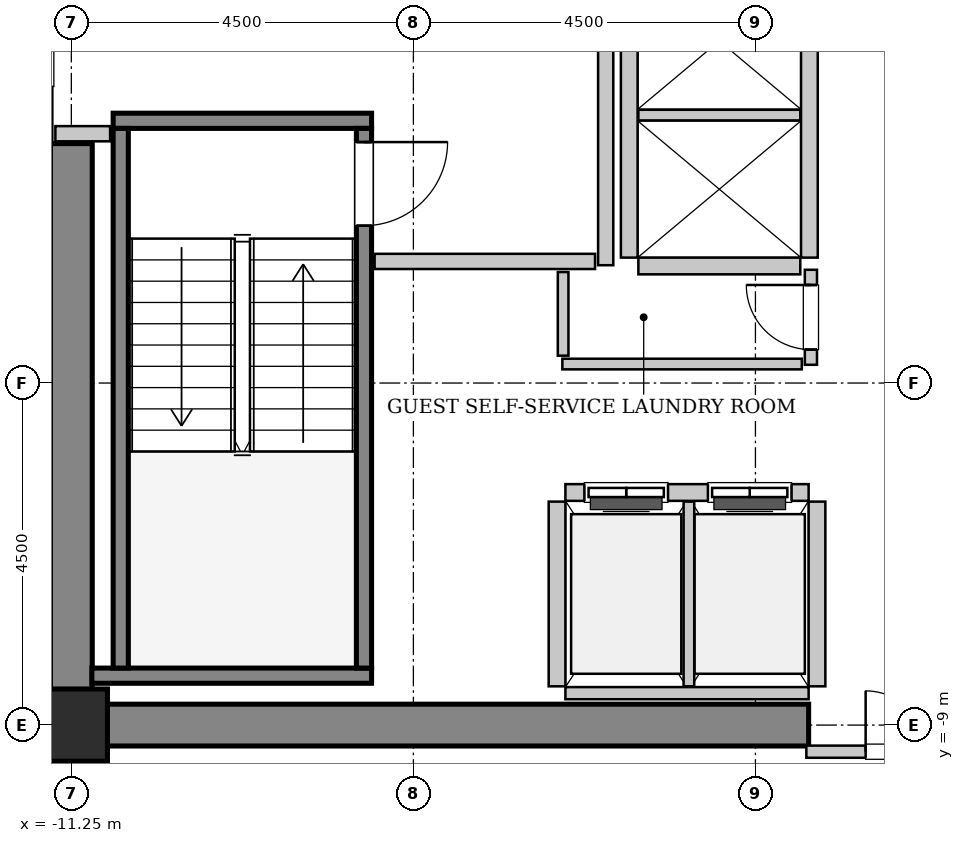
"""IFC4 building model, lengths in metres.
Left out: names, types, materials, properties, quantities, classifications, styles, units other than length and angle.
Written with IfcOpenShell. Run it as: python <this file> out.ifc"""

import sys

from ifc_helpers import new_model, si_unit, direction, frame, frame_2d, origin, origin_2d, place, context, subcontext, project, spatial, rectangle, hollow_rectangle, extrude, source, transform, mapped, element, fill, save


model = new_model("IFC4")
c1 = context("Model", 3, precision=1e-05, world=origin(), true_north=direction((0.0, 1.0)))
c2 = subcontext(c1, "Body", "Model", "MODEL_VIEW")
j1 = project(units=[si_unit("LENGTHUNIT", "METRE"), si_unit("PLANEANGLEUNIT", "RADIAN")], contexts=[c1])
p1 = place(None, origin())
s1 = spatial("IfcSite", under=j1, at=p1, CompositionType="ELEMENT")
p2 = place(p1, origin())
s2 = spatial("IfcBuilding", under=s1, at=p2, CompositionType="ELEMENT")
p3 = place(p2, frame((0.0, 0.0, 167.8)))
s3 = spatial("IfcBuildingStorey", under=s2, at=p3, CompositionType="ELEMENT", Elevation=167.8)
m1 = source(origin(), c2, "Body", "SweptSolid", [
    extrude(rectangle(XDim=9.975, YDim=0.55, at=frame_2d((4.987, 0.0))), origin(), (0.0, 0.0, 1.0), 3.8),
])
p4 = place(p3, frame((-11.525, -9.0, 0.0), z_axis=(0.0, 0.0, 1.0), x_axis=(1.0, 0.0, 0.0)))
e1 = element("IfcWall", 1, at=p4, inside=s3, PredefinedType="SHEAR", context=c2, shape_type="MappedRepresentation", body=[
    mapped(m1, transform((0.0, 0.0, 0.0), x_axis=(1.0, 0.0, 0.0), y_axis=(0.0, 1.0, 0.0), z_axis=(0.0, 0.0, 1.0), scale=1.0)),
])
m2 = source(origin(), c2, "Body", "SweptSolid", [
    extrude(rectangle(XDim=7.375, YDim=0.55, at=frame_2d((3.688, 0.0))), origin(), (0.0, 0.0, 1.0), 3.8),
])
p5 = place(p3, frame((-11.25, -8.725, 0.0), z_axis=(0.0, 0.0, 1.0), x_axis=(0.0, 1.0, 0.0)))
e2 = element("IfcWall", 2, at=p5, inside=s3, PredefinedType="SHEAR", context=c2, shape_type="MappedRepresentation", body=[
    mapped(m2, transform((0.0, 0.0, 0.0), x_axis=(1.0, 0.0, 0.0), y_axis=(0.0, 1.0, 0.0), z_axis=(0.0, 0.0, 1.0), scale=1.0)),
])
m3 = source(origin(), c2, "Body", "SweptSolid", [
    extrude(hollow_rectangle(XDim=0.95, YDim=0.95, WallThickness=0.045, InnerFilletRadius=0.045, OuterFilletRadius=0.09, at=origin_2d()), origin(), (0.0, 0.0, 1.0), 3.8),
])
p6 = place(p3, frame((-11.25, -9.0, 0.0), z_axis=(0.0, 0.0, 1.0), x_axis=(1.0, 0.0, 0.0)))
e3 = element("IfcColumn", 3, at=p6, inside=s3, PredefinedType="COLUMN", context=c2, shape_type="MappedRepresentation", body=[
    mapped(m3, transform((0.0, 0.0, 0.0), x_axis=(1.0, 0.0, 0.0), y_axis=(0.0, 1.0, 0.0), z_axis=(0.0, 0.0, 1.0), scale=1.0)),
])
m4 = source(origin(), c2, "Body", "SweptSolid", [
    extrude(rectangle(XDim=3.4, YDim=0.2, at=frame_2d((1.7, 0.0))), origin(), (0.0, 0.0, 1.0), 3.8),
])
p7 = place(p3, frame((-10.7, -1.05, 0.0), z_axis=(0.0, 0.0, 1.0), x_axis=(1.0, 0.0, 0.0)))
e4 = element("IfcWall", 4, at=p7, inside=s3, PredefinedType="SOLIDWALL", context=c2, shape_type="MappedRepresentation", body=[
    mapped(m4, transform((0.0, 0.0, 0.0), x_axis=(1.0, 0.0, 0.0), y_axis=(0.0, 1.0, 0.0), z_axis=(0.0, 0.0, 1.0), scale=1.0)),
])
m5 = source(origin(), c2, "Body", "SweptSolid", [
    extrude(rectangle(XDim=3.68, YDim=0.2, at=frame_2d((1.84, 0.0))), origin(), (0.0, 0.0, 1.0), 3.8),
])
p8 = place(p3, frame((-10.98, -8.35, 0.0), z_axis=(0.0, 0.0, 1.0), x_axis=(1.0, 0.0, 0.0)))
e5 = element("IfcWall", 5, at=p8, inside=s3, PredefinedType="SOLIDWALL", context=c2, shape_type="MappedRepresentation", body=[
    mapped(m5, transform((0.0, 0.0, 0.0), x_axis=(1.0, 0.0, 0.0), y_axis=(0.0, 1.0, 0.0), z_axis=(0.0, 0.0, 1.0), scale=1.0)),
])
m6 = source(origin(), c2, "Body", "SweptSolid", [
    extrude(rectangle(XDim=7.1, YDim=0.2, at=frame_2d((3.55, 0.0))), origin(), (0.0, 0.0, 1.0), 3.8),
])
p9 = place(p3, frame((-10.6, -1.15, 0.0), z_axis=(0.0, 0.0, 1.0), x_axis=(0.0, -1.0, 0.0)))
e6 = element("IfcWall", 6, at=p9, inside=s3, PredefinedType="SOLIDWALL", context=c2, shape_type="MappedRepresentation", body=[
    mapped(m6, transform((0.0, 0.0, 0.0), x_axis=(1.0, 0.0, 0.0), y_axis=(0.0, 1.0, 0.0), z_axis=(0.0, 0.0, 1.0), scale=1.0)),
])
p10 = place(p3, frame((-7.4, -1.15, 0.0), z_axis=(0.0, 0.0, 1.0), x_axis=(0.0, -1.0, 0.0)))
e7 = element("IfcWall", 7, at=p10, inside=s3, PredefinedType="SOLIDWALL", context=c2, shape_type="MappedRepresentation", body=[
    mapped(m6, transform((0.0, 0.0, 0.0), x_axis=(1.0, 0.0, 0.0), y_axis=(0.0, 1.0, 0.0), z_axis=(0.0, 0.0, 1.0), scale=1.0)),
])
p11 = place(p10, frame((0.18, 0.0, 0.0)))
e8 = element("IfcOpeningElement", 8, at=p11, cuts=e7, PredefinedType="OPENING", context=c2, shape_type="SweptSolid", body=[
    extrude(rectangle(XDim=1.1, YDim=2.15, at=frame_2d((0.55, 1.075))), frame((0.0, 0.11, 0.0), z_axis=(0.0, -1.0, 0.0), x_axis=(1.0, 0.0, 0.0)), (0.0, 0.0, 1.0), 0.22),
])
m7 = source(origin(), c2, "Body", "SweptSolid", [
    extrude(rectangle(XDim=3.2, YDim=0.22, at=frame_2d((1.6, 0.0))), origin(), (0.0, 0.0, 1.0), 3.535),
])
p12 = place(p3, frame((-1.55, -5.94, 0.0), z_axis=(0.0, 0.0, 1.0), x_axis=(-1.0, 0.0, 0.0)))
e9 = element("IfcWall", 9, at=p12, inside=s3, PredefinedType="SOLIDWALL", context=c2, shape_type="MappedRepresentation", body=[
    mapped(m7, transform((0.0, 0.0, 0.0), x_axis=(1.0, 0.0, 0.0), y_axis=(0.0, 1.0, 0.0), z_axis=(0.0, 0.0, 1.0), scale=1.0)),
])
p13 = place(p12, frame((1.85, 0.0, 0.0)))
e10 = element("IfcOpeningElement", 10, at=p13, cuts=e9, PredefinedType="OPENING", context=c2, shape_type="SweptSolid", body=[
    extrude(rectangle(XDim=1.1, YDim=2.2, at=frame_2d((0.55, 1.1))), frame((0.0, 0.12, 0.0), z_axis=(0.0, -1.0, 0.0), x_axis=(1.0, 0.0, 0.0)), (0.0, 0.0, 1.0), 0.24),
])
p14 = place(p12, frame((0.225, 0.0, 0.0)))
e11 = element("IfcOpeningElement", 11, at=p14, cuts=e9, PredefinedType="OPENING", context=c2, shape_type="SweptSolid", body=[
    extrude(rectangle(XDim=1.1, YDim=2.2, at=frame_2d((0.55, 1.1))), frame((0.0, 0.12, 0.0), z_axis=(0.0, -1.0, 0.0), x_axis=(1.0, 0.0, 0.0)), (0.0, 0.0, 1.0), 0.24),
])
m8 = source(origin(), c2, "Body", "SweptSolid", [
    extrude(rectangle(XDim=3.2, YDim=0.16, at=frame_2d((1.6, 0.0))), origin(), (0.0, 0.0, 1.0), 2.425),
])
p15 = place(p3, frame((-4.75, -8.58, 0.0), z_axis=(0.0, 0.0, 1.0), x_axis=(1.0, 0.0, 0.0)))
e12 = element("IfcWall", 12, at=p15, inside=s3, PredefinedType="PARTITIONING", context=c2, shape_type="MappedRepresentation", body=[
    mapped(m8, transform((0.0, 0.0, 0.0), x_axis=(1.0, 0.0, 0.0), y_axis=(0.0, 1.0, 0.0), z_axis=(0.0, 0.0, 1.0), scale=1.0)),
])
m9 = source(origin(), c2, "Body", "SweptSolid", [
    extrude(rectangle(XDim=2.43, YDim=0.22, at=frame_2d((1.215, 0.0))), origin(), (0.0, 0.0, 1.0), 3.535),
])
p16 = place(p3, frame((-4.86, -6.06, 0.0), z_axis=(0.0, 0.0, 1.0), x_axis=(0.0, -1.0, 0.0)))
e13 = element("IfcWall", 13, at=p16, inside=s3, PredefinedType="SOLIDWALL", context=c2, shape_type="MappedRepresentation", body=[
    mapped(m9, transform((0.0, 0.0, 0.0), x_axis=(1.0, 0.0, 0.0), y_axis=(0.0, 1.0, 0.0), z_axis=(0.0, 0.0, 1.0), scale=1.0)),
])
m10 = source(origin(), c2, "Body", "SweptSolid", [
    extrude(rectangle(XDim=2.43, YDim=0.14, at=frame_2d((1.215, 0.0))), origin(), (0.0, 0.0, 1.0), 3.535),
])
p17 = place(p3, frame((-3.125, -8.49, 0.0), z_axis=(0.0, 0.0, 1.0), x_axis=(0.0, 1.0, 0.0)))
e14 = element("IfcWall", 14, at=p17, inside=s3, PredefinedType="PARTITIONING", context=c2, shape_type="MappedRepresentation", body=[
    mapped(m10, transform((0.0, 0.0, 0.0), x_axis=(1.0, 0.0, 0.0), y_axis=(0.0, 1.0, 0.0), z_axis=(0.0, 0.0, 1.0), scale=1.0)),
])
p18 = place(p3, frame((-1.44, -8.49, 0.0), z_axis=(0.0, 0.0, 1.0), x_axis=(0.0, 1.0, 0.0)))
e15 = element("IfcWall", 15, at=p18, inside=s3, PredefinedType="SOLIDWALL", context=c2, shape_type="MappedRepresentation", body=[
    mapped(m9, transform((0.0, 0.0, 0.0), x_axis=(1.0, 0.0, 0.0), y_axis=(0.0, 1.0, 0.0), z_axis=(0.0, 0.0, 1.0), scale=1.0)),
])
m11 = source(origin(), c2, "Body", "SweptSolid", [
    extrude(rectangle(XDim=5.7, YDim=0.22, at=frame_2d((2.85, 0.0))), origin(), (0.0, 0.0, 1.0), 3.535),
])
for number, where, z_axis, x_axis in (
    (16, (-1.54, -2.85, 0.0), (0.0, 0.0, 1.0), (0.0, 1.0, 0.0)),
    (17, (-3.91, 2.85, 0.0), (0.0, 0.0, 1.0), (0.0, -1.0, 0.0)),
):
    element("IfcWall", number, at=place(p3, frame(where, z_axis=z_axis, x_axis=x_axis)), inside=s3, PredefinedType="SOLIDWALL", context=c2, shape_type="MappedRepresentation", body=[
        mapped(m11, transform((0.0, 0.0, 0.0), x_axis=(1.0, 0.0, 0.0), y_axis=(0.0, 1.0, 0.0), z_axis=(0.0, 0.0, 1.0), scale=1.0)),
    ])
m12 = source(origin(), c2, "Body", "SweptSolid", [
    extrude(rectangle(XDim=2.13, YDim=0.22, at=frame_2d((1.065, 0.0))), origin(), (0.0, 0.0, 1.0), 3.535),
])
p19 = place(p3, frame((-3.79, -2.96, 0.0), z_axis=(0.0, 0.0, 1.0), x_axis=(1.0, 0.0, 0.0)))
e18 = element("IfcWall", 18, at=p19, inside=s3, PredefinedType="SOLIDWALL", context=c2, shape_type="MappedRepresentation", body=[
    mapped(m12, transform((0.0, 0.0, 0.0), x_axis=(1.0, 0.0, 0.0), y_axis=(0.0, 1.0, 0.0), z_axis=(0.0, 0.0, 1.0), scale=1.0)),
])
m13 = source(origin(), c2, "Body", "SweptSolid", [
    extrude(rectangle(XDim=2.13, YDim=0.14, at=frame_2d((1.065, 0.0))), origin(), (0.0, 0.0, 1.0), 3.535),
])
p20 = place(p3, frame((-3.79, -0.975, 0.0), z_axis=(0.0, 0.0, 1.0), x_axis=(1.0, 0.0, 0.0)))
e19 = element("IfcWall", 19, at=p20, inside=s3, PredefinedType="PARTITIONING", context=c2, shape_type="MappedRepresentation", body=[
    mapped(m13, transform((0.0, 0.0, 0.0), x_axis=(1.0, 0.0, 0.0), y_axis=(0.0, 1.0, 0.0), z_axis=(0.0, 0.0, 1.0), scale=1.0)),
])
m14 = source(origin(), c2, "Body", "SweptSolid", [
    extrude(rectangle(XDim=5.9, YDim=0.2, at=frame_2d((2.95, 0.0))), origin(), (0.0, 0.0, 1.0), 3.535),
])
p21 = place(p3, frame((-4.22, -2.95, 0.0), z_axis=(0.0, 0.0, 1.0), x_axis=(0.0, 1.0, 0.0)))
e20 = element("IfcWall", 20, at=p21, inside=s3, PredefinedType="PARTITIONING", context=c2, shape_type="MappedRepresentation", body=[
    mapped(m14, transform((0.0, 0.0, 0.0), x_axis=(1.0, 0.0, 0.0), y_axis=(0.0, 1.0, 0.0), z_axis=(0.0, 0.0, 1.0), scale=1.0)),
])
m15 = source(origin(), c2, "Body", "SweptSolid", [
    extrude(rectangle(XDim=2.9, YDim=0.2, at=frame_2d((1.45, 0.0))), origin(), (0.0, 0.0, 1.0), 3.535),
])
p22 = place(p3, frame((-7.26, -2.9, 0.0), z_axis=(0.0, 0.0, 1.0), x_axis=(1.0, 0.0, 0.0)))
e21 = element("IfcWall", 21, at=p22, inside=s3, PredefinedType="PARTITIONING", context=c2, shape_type="MappedRepresentation", body=[
    mapped(m15, transform((0.0, 0.0, 0.0), x_axis=(1.0, 0.0, 0.0), y_axis=(0.0, 1.0, 0.0), z_axis=(0.0, 0.0, 1.0), scale=1.0)),
])
m16 = source(origin(), c2, "Body", "SweptSolid", [
    extrude(rectangle(XDim=0.72, YDim=0.2, at=frame_2d((0.36, 0.0))), origin(), (0.0, 0.0, 1.0), 3.535),
])
p23 = place(p3, frame((-11.46, -1.22, 0.0), z_axis=(0.0, 0.0, 1.0), x_axis=(1.0, 0.0, 0.0)))
e22 = element("IfcWall", 22, at=p23, inside=s3, PredefinedType="PARTITIONING", context=c2, shape_type="MappedRepresentation", body=[
    mapped(m16, transform((0.0, 0.0, 0.0), x_axis=(1.0, 0.0, 0.0), y_axis=(0.0, 1.0, 0.0), z_axis=(0.0, 0.0, 1.0), scale=1.0)),
])
m17 = source(origin(), c2, "Body", "SweptSolid", [
    extrude(rectangle(XDim=3.16, YDim=0.16, at=frame_2d((1.58, 0.0))), origin(), (0.0, 0.0, 1.0), 2.425),
])
p24 = place(p3, frame((-1.58, -9.35, 0.0), z_axis=(0.0, 0.0, 1.0), x_axis=(1.0, 0.0, 0.0)))
e23 = element("IfcWall", 23, at=p24, inside=s3, PredefinedType="PARTITIONING", context=c2, shape_type="MappedRepresentation", body=[
    mapped(m17, transform((0.0, 0.0, 0.0), x_axis=(1.0, 0.0, 0.0), y_axis=(0.0, 1.0, 0.0), z_axis=(0.0, 0.0, 1.0), scale=1.0)),
])
p25 = place(p24, frame((0.78, 0.0, 0.0)))
e24 = element("IfcOpeningElement", 24, at=p25, cuts=e23, PredefinedType="OPENING", context=c2, shape_type="SweptSolid", body=[
    extrude(rectangle(XDim=1.6, YDim=2.3, at=frame_2d((0.8, 1.15))), frame((0.0, 0.09, 0.0), z_axis=(0.0, -1.0, 0.0), x_axis=(1.0, 0.0, 0.0)), (0.0, 0.0, 1.0), 0.18),
])
m18 = source(origin(), c2, "Body", "SweptSolid", [
    extrude(rectangle(XDim=1.25, YDim=0.16, at=frame_2d((0.625, 0.0))), origin(), (0.0, 0.0, 1.0), 3.535),
])
p26 = place(p3, frame((-1.52, -4.26, 0.0), z_axis=(0.0, 0.0, 1.0), x_axis=(0.0, 1.0, 0.0)))
e25 = element("IfcWall", 25, at=p26, inside=s3, PredefinedType="PARTITIONING", context=c2, shape_type="MappedRepresentation", body=[
    mapped(m18, transform((0.0, 0.0, 0.0), x_axis=(1.0, 0.0, 0.0), y_axis=(0.0, 1.0, 0.0), z_axis=(0.0, 0.0, 1.0), scale=1.0)),
])
p27 = place(p26, frame((0.2, 0.0, 0.0)))
e26 = element("IfcOpeningElement", 26, at=p27, cuts=e25, PredefinedType="OPENING", context=c2, shape_type="SweptSolid", body=[
    extrude(rectangle(XDim=0.85, YDim=2.1, at=frame_2d((0.425, 1.05))), frame((0.0, 0.09, 0.0), z_axis=(0.0, -1.0, 0.0), x_axis=(1.0, 0.0, 0.0)), (0.0, 0.0, 1.0), 0.18),
])
m19 = source(origin(), c2, "Body", "SweptSolid", [
    extrude(rectangle(XDim=3.15, YDim=0.14, at=frame_2d((1.575, 0.0))), origin(), (0.0, 0.0, 1.0), 3.535),
])
p28 = place(p3, frame((-4.79, -4.25, 0.0), z_axis=(0.0, 0.0, 1.0), x_axis=(1.0, 0.0, 0.0)))
e27 = element("IfcWall", 27, at=p28, inside=s3, PredefinedType="PARTITIONING", context=c2, shape_type="MappedRepresentation", body=[
    mapped(m19, transform((0.0, 0.0, 0.0), x_axis=(1.0, 0.0, 0.0), y_axis=(0.0, 1.0, 0.0), z_axis=(0.0, 0.0, 1.0), scale=1.0)),
])
m20 = source(origin(), c2, "Body", "SweptSolid", [
    extrude(rectangle(XDim=1.1, YDim=0.14, at=frame_2d((0.55, 0.0))), origin(), (0.0, 0.0, 1.0), 3.535),
])
p29 = place(p3, frame((-4.78, -4.14, 0.0), z_axis=(0.0, 0.0, 1.0), x_axis=(0.0, 1.0, 0.0)))
e28 = element("IfcWall", 28, at=p29, inside=s3, PredefinedType="PARTITIONING", context=c2, shape_type="MappedRepresentation", body=[
    mapped(m20, transform((0.0, 0.0, 0.0), x_axis=(1.0, 0.0, 0.0), y_axis=(0.0, 1.0, 0.0), z_axis=(0.0, 0.0, 1.0), scale=1.0)),
])
m21 = source(origin(), c2, "Body", "SweptSolid", [
    extrude(rectangle(XDim=1.1, YDim=2.15, at=frame_2d((0.55, 1.075))), frame((0.0, 0.025, 0.0), z_axis=(0.0, -1.0, 0.0), x_axis=(1.0, 0.0, 0.0)), (0.0, 0.0, 1.0), 0.05),
])
p30 = place(p11, origin())
e29 = element("IfcDoor", 29, at=p30, inside=s3, OperationType="SINGLE_SWING_LEFT", PredefinedType="DOOR", context=c2, shape_type="MappedRepresentation", body=[
    mapped(m21, transform((0.0, 0.0, 0.0), x_axis=(1.0, 0.0, 0.0), y_axis=(0.0, 1.0, 0.0), z_axis=(0.0, 0.0, 1.0), scale=1.0)),
])
fill(e8, e29)
m22 = source(origin(), c2, "Body", "SweptSolid", [
    extrude(rectangle(XDim=1.1, YDim=2.2, at=frame_2d((0.55, 1.1))), frame((0.0, 0.025, 0.0), z_axis=(0.0, -1.0, 0.0), x_axis=(1.0, 0.0, 0.0)), (0.0, 0.0, 1.0), 0.05),
])
p31 = place(p13, origin())
e30 = element("IfcDoor", 30, at=p31, inside=s3, OperationType="DOUBLE_DOOR_SLIDING", PredefinedType="DOOR", context=c2, shape_type="MappedRepresentation", body=[
    mapped(m22, transform((0.0, 0.0, 0.0), x_axis=(1.0, 0.0, 0.0), y_axis=(0.0, 1.0, 0.0), z_axis=(0.0, 0.0, 1.0), scale=1.0)),
])
fill(e10, e30)
p32 = place(p14, origin())
e31 = element("IfcDoor", 31, at=p32, inside=s3, OperationType="DOUBLE_DOOR_SLIDING", PredefinedType="DOOR", context=c2, shape_type="MappedRepresentation", body=[
    mapped(m22, transform((0.0, 0.0, 0.0), x_axis=(1.0, 0.0, 0.0), y_axis=(0.0, 1.0, 0.0), z_axis=(0.0, 0.0, 1.0), scale=1.0)),
])
fill(e11, e31)
m23 = source(origin(), c2, "Body", "SweptSolid", [
    extrude(rectangle(XDim=1.6, YDim=2.3, at=frame_2d((0.8, 1.15))), frame((0.0, 0.025, 0.0), z_axis=(0.0, -1.0, 0.0), x_axis=(1.0, 0.0, 0.0)), (0.0, 0.0, 1.0), 0.05),
])
p33 = place(p25, origin())
e32 = element("IfcDoor", 32, at=p33, inside=s3, OperationType="DOUBLE_DOOR_SINGLE_SWING", PredefinedType="DOOR", context=c2, shape_type="MappedRepresentation", body=[
    mapped(m23, transform((0.0, 0.0, 0.0), x_axis=(1.0, 0.0, 0.0), y_axis=(0.0, 1.0, 0.0), z_axis=(0.0, 0.0, 1.0), scale=1.0)),
])
fill(e24, e32)
m24 = source(origin(), c2, "Body", "SweptSolid", [
    extrude(rectangle(XDim=0.85, YDim=2.1, at=frame_2d((0.425, 1.05))), frame((0.0, 0.025, 0.0), z_axis=(0.0, -1.0, 0.0), x_axis=(1.0, 0.0, 0.0)), (0.0, 0.0, 1.0), 0.05),
])
p34 = place(p27, origin())
e33 = element("IfcDoor", 33, at=p34, inside=s3, OperationType="SINGLE_SWING_RIGHT", PredefinedType="DOOR", context=c2, shape_type="MappedRepresentation", body=[
    mapped(m24, transform((0.0, 0.0, 0.0), x_axis=(1.0, 0.0, 0.0), y_axis=(0.0, 1.0, 0.0), z_axis=(0.0, 0.0, 1.0), scale=1.0)),
])
fill(e26, e33)
save(model, sys.argv[1])
